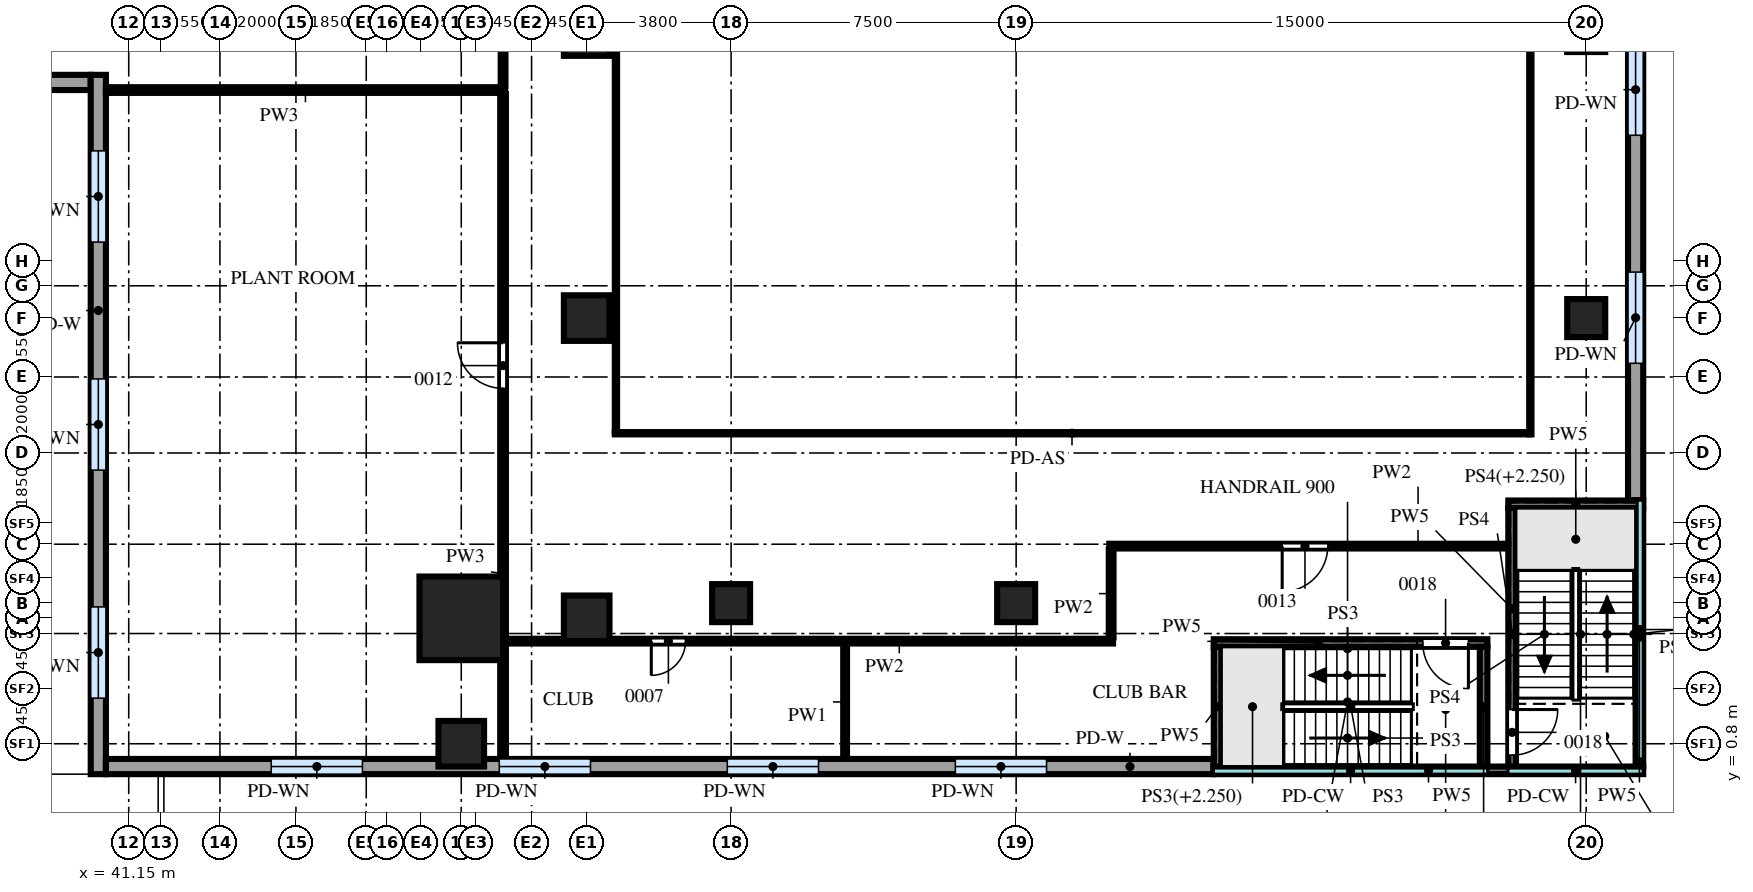
"""IFC4 building model, lengths in metres.
Left out: names, types, materials, properties, quantities, classifications, styles, units other than length and angle.
Written with IfcOpenShell. Run it as: python <this file> out.ifc"""

import sys

from ifc_helpers import new_model, si_unit, direction, frame, frame_2d, origin, origin_2d, place, context, subcontext, project, spatial, rectangle, extrude, source, transform, mapped, element, fill, save


model = new_model("IFC4")
c1 = context("Model", 3, precision=1e-05, world=origin(), true_north=direction((0.0, 1.0)))
c2 = subcontext(c1, "Body", "Model", "MODEL_VIEW")
j1 = project(units=[si_unit("LENGTHUNIT", "METRE"), si_unit("PLANEANGLEUNIT", "RADIAN")], contexts=[c1])
p1 = place(None, origin())
s1 = spatial("IfcSite", under=j1, at=p1, CompositionType="ELEMENT")
p2 = place(p1, origin())
s2 = spatial("IfcBuilding", under=s1, at=p2, CompositionType="ELEMENT")
p3 = place(p2, frame((0.0, 0.0, 28.5)))
s3 = spatial("IfcBuildingStorey", under=s2, at=p3, CompositionType="ELEMENT", Elevation=28.5)
m1 = source(origin(), c2, "Body", "SweptSolid", [
    extrude(rectangle(XDim=2.2, YDim=2.2, at=origin_2d()), origin(), (0.0, 0.0, 1.0), 4.5),
])
p4 = place(p3, frame((49.9, 4.1, 0.0), z_axis=(0.0, 0.0, 1.0), x_axis=(1.0, 0.0, 0.0)))
e1 = element("IfcColumn", 1, at=p4, inside=s3, PredefinedType="COLUMN", context=c2, shape_type="MappedRepresentation", body=[
    mapped(m1, transform((0.0, 0.0, 0.0))),
])
m2 = source(origin(), c2, "Body", "SweptSolid", [
    extrude(rectangle(XDim=1.2, YDim=1.2, at=origin_2d()), origin(), (0.0, 0.0, 1.0), 4.0),
])
for number, where, z_axis, x_axis in (
    (2, (49.9, 0.8, 0.0), (0.0, 0.0, 1.0), (1.0, 0.0, 0.0)),
    (3, (53.2, 4.1, 0.0), (0.0, 0.0, 1.0), (1.0, 0.0, 0.0)),
    (4, (53.2, 12.0, 0.0), (0.0, 0.0, 1.0), (1.0, 0.0, 0.0)),
    (5, (53.2, 19.5, 0.0), (0.0, 0.0, 1.0), (1.0, 0.0, 0.0)),
):
    element("IfcColumn", number, at=place(p3, frame(where, z_axis=z_axis, x_axis=x_axis)), inside=s3, PredefinedType="COLUMN", context=c2, shape_type="MappedRepresentation", body=[
        mapped(m2, transform((0.0, 0.0, 0.0))),
    ])
m3 = source(origin(), c2, "Body", "SweptSolid", [
    extrude(rectangle(XDim=1.0, YDim=1.0, at=origin_2d()), origin(), (0.0, 0.0, 1.0), 4.5),
])
for number, where, z_axis, x_axis in (
    (6, (57.0, 4.5, 0.0), (0.0, 0.0, 1.0), (1.0, 0.0, 0.0)),
    (7, (64.5, 4.5, 0.0), (0.0, 0.0, 1.0), (1.0, 0.0, 0.0)),
    (8, (79.5, 12.0, 0.0), (0.0, 0.0, 1.0), (1.0, 0.0, 0.0)),
):
    element("IfcColumn", number, at=place(p3, frame(where, z_axis=z_axis, x_axis=x_axis)), inside=s3, PredefinedType="COLUMN", context=c2, shape_type="MappedRepresentation", body=[
        mapped(m3, transform((0.0, 0.0, 0.0))),
    ])
m4 = source(origin(), c2, "Body", "SweptSolid", [
    extrude(rectangle(XDim=8.7, YDim=0.4, at=frame_2d((4.35, 0.0))), origin(), (0.0, 0.0, 1.0), 4.2),
])
p5 = place(p3, frame((31.45, 18.2, 0.0), z_axis=(0.0, 0.0, 1.0), x_axis=(1.0, 0.0, 0.0)))
e9 = element("IfcWall", 9, at=p5, inside=s3, PredefinedType="SOLIDWALL", context=c2, shape_type="MappedRepresentation", body=[
    mapped(m4, transform((0.0, 0.0, 0.0))),
])
m5 = source(origin(), c2, "Body", "SweptSolid", [
    extrude(rectangle(XDim=2.4, YDim=2.4, at=frame_2d((1.2, 1.2))), frame((0.0, 0.21, 0.0), z_axis=(0.0, -1.0, 0.0), x_axis=(1.0, 0.0, 0.0)), (0.0, 0.0, 1.0), 0.42),
])
p6 = place(p5, frame((3.15, 0.0, 1.0)))
e10 = element("IfcOpeningElement", 10, at=p6, cuts=e9, PredefinedType="OPENING", context=c2, shape_type="MappedRepresentation", body=[
    mapped(m5, transform((0.0, 0.0, 0.0))),
])
m6 = source(origin(), c2, "Body", "SweptSolid", [
    extrude(rectangle(XDim=18.4, YDim=0.4, at=frame_2d((9.2, 0.0))), origin(), (0.0, 0.0, 1.0), 4.2),
])
p7 = place(p3, frame((40.35, 18.4, 0.0), z_axis=(0.0, 0.0, 1.0), x_axis=(0.0, -1.0, 0.0)))
e11 = element("IfcWall", 11, at=p7, inside=s3, PredefinedType="SOLIDWALL", context=c2, shape_type="MappedRepresentation", body=[
    mapped(m6, transform((0.0, 0.0, 0.0))),
])
p8 = place(p7, frame((2.0, 0.0, 1.0)))
e12 = element("IfcOpeningElement", 12, at=p8, cuts=e11, PredefinedType="OPENING", context=c2, shape_type="MappedRepresentation", body=[
    mapped(m5, transform((0.0, 0.0, 0.0))),
])
p9 = place(p7, frame((8.0, 0.0, 1.0)))
e13 = element("IfcOpeningElement", 13, at=p9, cuts=e11, PredefinedType="OPENING", context=c2, shape_type="MappedRepresentation", body=[
    mapped(m5, transform((0.0, 0.0, 0.0))),
])
p10 = place(p7, frame((14.0, 0.0, 1.0)))
e14 = element("IfcOpeningElement", 14, at=p10, cuts=e11, PredefinedType="OPENING", context=c2, shape_type="MappedRepresentation", body=[
    mapped(m5, transform((0.0, 0.0, 0.0))),
])
m7 = source(origin(), c2, "Body", "SweptSolid", [
    extrude(rectangle(XDim=29.14, YDim=0.4, at=frame_2d((14.57, 0.0))), origin(), (0.0, 0.0, 1.0), 4.2),
])
p11 = place(p3, frame((40.55, 0.2, 0.0), z_axis=(0.0, 0.0, 1.0), x_axis=(1.0, 0.0, 0.0)))
e15 = element("IfcWall", 15, at=p11, inside=s3, PredefinedType="SOLIDWALL", context=c2, shape_type="MappedRepresentation", body=[
    mapped(m7, transform((0.0, 0.0, 0.0))),
])
p12 = place(p11, frame((4.35, 0.0, 1.0)))
e16 = element("IfcOpeningElement", 16, at=p12, cuts=e15, PredefinedType="OPENING", context=c2, shape_type="MappedRepresentation", body=[
    mapped(m5, transform((0.0, 0.0, 0.0))),
])
p13 = place(p11, frame((10.35, 0.0, 1.0)))
e17 = element("IfcOpeningElement", 17, at=p13, cuts=e15, PredefinedType="OPENING", context=c2, shape_type="MappedRepresentation", body=[
    mapped(m5, transform((0.0, 0.0, 0.0))),
])
p14 = place(p11, frame((16.35, 0.0, 1.0)))
e18 = element("IfcOpeningElement", 18, at=p14, cuts=e15, PredefinedType="OPENING", context=c2, shape_type="MappedRepresentation", body=[
    mapped(m5, transform((0.0, 0.0, 0.0))),
])
p15 = place(p11, frame((22.35, 0.0, 1.0)))
e19 = element("IfcOpeningElement", 19, at=p15, cuts=e15, PredefinedType="OPENING", context=c2, shape_type="MappedRepresentation", body=[
    mapped(m5, transform((0.0, 0.0, 0.0))),
])
m8 = source(origin(), c2, "Body", "SweptSolid", [
    extrude(rectangle(XDim=39.58, YDim=0.4, at=frame_2d((19.79, 0.0))), origin(), (0.0, 0.0, 1.0), 4.2),
])
p16 = place(p3, frame((80.8, 7.21, 0.0), z_axis=(0.0, 0.0, 1.0), x_axis=(0.0, 1.0, 0.0)))
e20 = element("IfcWall", 20, at=p16, inside=s3, PredefinedType="SOLIDWALL", context=c2, shape_type="MappedRepresentation", body=[
    mapped(m8, transform((0.0, 0.0, 0.0))),
])
p17 = place(p16, frame((3.6, 0.0, 1.0)))
e21 = element("IfcOpeningElement", 21, at=p17, cuts=e20, PredefinedType="OPENING", context=c2, shape_type="MappedRepresentation", body=[
    mapped(m5, transform((0.0, 0.0, 0.0))),
])
p18 = place(p16, frame((9.6, 0.0, 1.0)))
e22 = element("IfcOpeningElement", 22, at=p18, cuts=e20, PredefinedType="OPENING", context=c2, shape_type="MappedRepresentation", body=[
    mapped(m5, transform((0.0, 0.0, 0.0))),
])
p19 = place(p16, frame((15.6, 0.0, 1.0)))
e23 = element("IfcOpeningElement", 23, at=p19, cuts=e20, PredefinedType="OPENING", context=c2, shape_type="MappedRepresentation", body=[
    mapped(m5, transform((0.0, 0.0, 0.0))),
])
p20 = place(p16, frame((21.6, 0.0, 1.0)))
e24 = element("IfcOpeningElement", 24, at=p20, cuts=e20, PredefinedType="OPENING", context=c2, shape_type="MappedRepresentation", body=[
    mapped(m5, transform((0.0, 0.0, 0.0))),
])
p21 = place(p16, frame((27.6, 0.0, 1.0)))
e25 = element("IfcOpeningElement", 25, at=p21, cuts=e20, PredefinedType="OPENING", context=c2, shape_type="MappedRepresentation", body=[
    mapped(m5, transform((0.0, 0.0, 0.0))),
])
p22 = place(p16, frame((33.6, 0.0, 1.0)))
e26 = element("IfcOpeningElement", 26, at=p22, cuts=e20, PredefinedType="OPENING", context=c2, shape_type="MappedRepresentation", body=[
    mapped(m5, transform((0.0, 0.0, 0.0))),
])
m9 = source(origin(), c2, "Body", "SweptSolid", [
    extrude(rectangle(XDim=36.06, YDim=0.06, at=frame_2d((18.03, 0.0))), origin(), (0.0, 0.0, 1.0), 4.2),
])
for number, where, z_axis, x_axis in (
    (27, (78.03, 8.94, 0.0), (0.0, 0.0, 1.0), (0.0, 1.0, 0.0)),
    (28, (53.97, 45.06, 0.0), (0.0, 0.0, 1.0), (0.0, -1.0, 0.0)),
):
    element("IfcWall", number, at=place(p3, frame(where, z_axis=z_axis, x_axis=x_axis)), inside=s3, PredefinedType="SOLIDWALL", context=c2, shape_type="MappedRepresentation", body=[
        mapped(m9, transform((0.0, 0.0, 0.0))),
    ])
m10 = source(origin(), c2, "Body", "SweptSolid", [
    extrude(rectangle(XDim=24.06, YDim=0.06, at=frame_2d((12.03, 0.0))), origin(), (0.0, 0.0, 1.0), 4.2),
])
p23 = place(p3, frame((53.94, 8.97, 0.0), z_axis=(0.0, 0.0, 1.0), x_axis=(1.0, 0.0, 0.0)))
e29 = element("IfcWall", 29, at=p23, inside=s3, PredefinedType="SOLIDWALL", context=c2, shape_type="MappedRepresentation", body=[
    mapped(m10, transform((0.0, 0.0, 0.0))),
])
m11 = source(origin(), c2, "Body", "SweptSolid", [
    extrude(rectangle(XDim=11.3, YDim=0.2, at=frame_2d((5.65, 0.0))), origin(), (0.0, 0.0, 1.0), 4.0),
])
p24 = place(p3, frame((69.7, 0.1, 0.0), z_axis=(0.0, 0.0, 1.0), x_axis=(1.0, 0.0, 0.0)))
e30 = element("IfcWall", 30, at=p24, inside=s3, PredefinedType="PARTITIONING", context=c2, shape_type="MappedRepresentation", body=[
    mapped(m11, transform((0.0, 0.0, 0.0))),
])
m12 = source(origin(), c2, "Body", "SweptSolid", [
    extrude(rectangle(XDim=7.2, YDim=0.2, at=frame_2d((3.6, 0.0))), origin(), (0.0, 0.0, 1.0), 4.0),
])
p25 = place(p3, frame((69.7, 3.45, 0.0), z_axis=(0.0, 0.0, 1.0), x_axis=(1.0, 0.0, 0.0)))
e31 = element("IfcWall", 31, at=p25, inside=s3, PredefinedType="PARTITIONING", context=c2, shape_type="MappedRepresentation", body=[
    mapped(m12, transform((0.0, 0.0, 0.0))),
])
m13 = source(origin(), c2, "Body", "SweptSolid", [
    extrude(rectangle(XDim=1.2, YDim=2.1, at=frame_2d((0.6, 1.05))), frame((0.0, 0.11, 0.0), z_axis=(0.0, -1.0, 0.0), x_axis=(1.0, 0.0, 0.0)), (0.0, 0.0, 1.0), 0.22),
])
p26 = place(p25, frame((5.5, 0.0, 0.0)))
e32 = element("IfcOpeningElement", 32, at=p26, cuts=e31, PredefinedType="OPENING", context=c2, shape_type="MappedRepresentation", body=[
    mapped(m13, transform((0.0, 0.0, 0.0))),
])
m14 = source(origin(), c2, "Body", "SweptSolid", [
    extrude(rectangle(XDim=3.15, YDim=0.2, at=frame_2d((1.575, 0.0))), origin(), (0.0, 0.0, 1.0), 4.0),
])
for number, where, z_axis, x_axis in (
    (33, (69.8, 0.2, 0.0), (0.0, 0.0, 1.0), (0.0, 1.0, 0.0)),
    (34, (76.8, 0.2, 0.0), (0.0, 0.0, 1.0), (0.0, 1.0, 0.0)),
):
    element("IfcWall", number, at=place(p3, frame(where, z_axis=z_axis, x_axis=x_axis)), inside=s3, PredefinedType="PARTITIONING", context=c2, shape_type="MappedRepresentation", body=[
        mapped(m14, transform((0.0, 0.0, 0.0))),
    ])
m15 = source(origin(), c2, "Body", "SweptSolid", [
    extrude(rectangle(XDim=3.55, YDim=0.2, at=frame_2d((1.775, 0.0))), origin(), (0.0, 0.0, 1.0), 4.0),
])
p27 = place(p3, frame((77.45, 7.1, 0.0), z_axis=(0.0, 0.0, 1.0), x_axis=(1.0, 0.0, 0.0)))
e35 = element("IfcWall", 35, at=p27, inside=s3, PredefinedType="PARTITIONING", context=c2, shape_type="MappedRepresentation", body=[
    mapped(m15, transform((0.0, 0.0, 0.0))),
])
m16 = source(origin(), c2, "Body", "SweptSolid", [
    extrude(rectangle(XDim=6.8, YDim=0.2, at=frame_2d((3.4, 0.0))), origin(), (0.0, 0.0, 1.0), 4.0),
])
p28 = place(p3, frame((77.55, 0.2, 0.0), z_axis=(0.0, 0.0, 1.0), x_axis=(0.0, 1.0, 0.0)))
e36 = element("IfcWall", 36, at=p28, inside=s3, PredefinedType="PARTITIONING", context=c2, shape_type="MappedRepresentation", body=[
    mapped(m16, transform((0.0, 0.0, 0.0))),
])
p29 = place(p28, frame((0.3, 0.0, 0.0)))
e37 = element("IfcOpeningElement", 37, at=p29, cuts=e36, PredefinedType="OPENING", context=c2, shape_type="MappedRepresentation", body=[
    mapped(m13, transform((0.0, 0.0, 0.0))),
])
p30 = place(p3, frame((80.9, 0.2, 0.0), z_axis=(0.0, 0.0, 1.0), x_axis=(0.0, 1.0, 0.0)))
e38 = element("IfcWall", 38, at=p30, inside=s3, PredefinedType="PARTITIONING", context=c2, shape_type="MappedRepresentation", body=[
    mapped(m16, transform((0.0, 0.0, 0.0))),
])
m17 = source(origin(), c2, "Body", "SweptSolid", [
    extrude(rectangle(XDim=17.5, YDim=0.15, at=frame_2d((8.75, 0.0))), origin(), (0.0, 0.0, 1.0), 4.0),
])
p31 = place(p3, frame((51.0, 0.4, 0.0), z_axis=(0.0, 0.0, 1.0), x_axis=(0.0, 1.0, 0.0)))
e39 = element("IfcWall", 39, at=p31, inside=s3, PredefinedType="PARTITIONING", context=c2, shape_type="MappedRepresentation", body=[
    mapped(m17, transform((0.0, 0.0, 0.0))),
])
m18 = source(origin(), c2, "Body", "SweptSolid", [
    extrude(rectangle(XDim=1.2, YDim=2.1, at=frame_2d((0.6, 1.05))), frame((0.0, 0.085, 0.0), z_axis=(0.0, -1.0, 0.0), x_axis=(1.0, 0.0, 0.0)), (0.0, 0.0, 1.0), 0.17),
])
p32 = place(p31, frame((9.75, 0.0, 0.0)))
e40 = element("IfcOpeningElement", 40, at=p32, cuts=e39, PredefinedType="OPENING", context=c2, shape_type="MappedRepresentation", body=[
    mapped(m18, transform((0.0, 0.0, 0.0))),
])
m19 = source(origin(), c2, "Body", "SweptSolid", [
    extrude(rectangle(XDim=3.0, YDim=0.1, at=frame_2d((1.5, 0.0))), origin(), (0.0, 0.0, 1.0), 4.0),
])
p33 = place(p3, frame((60.0, 0.4, 0.0), z_axis=(0.0, 0.0, 1.0), x_axis=(0.0, 1.0, 0.0)))
e41 = element("IfcWall", 41, at=p33, inside=s3, PredefinedType="PARTITIONING", context=c2, shape_type="MappedRepresentation", body=[
    mapped(m19, transform((0.0, 0.0, 0.0))),
])
m20 = source(origin(), c2, "Body", "SweptSolid", [
    extrude(rectangle(XDim=15.95, YDim=0.125, at=frame_2d((7.975, 0.0))), origin(), (0.0, 0.0, 1.0), 4.0),
])
p34 = place(p3, frame((51.1, 3.5, 0.0), z_axis=(0.0, 0.0, 1.0), x_axis=(1.0, 0.0, 0.0)))
e42 = element("IfcWall", 42, at=p34, inside=s3, PredefinedType="PARTITIONING", context=c2, shape_type="MappedRepresentation", body=[
    mapped(m20, transform((0.0, 0.0, 0.0))),
])
m21 = source(origin(), c2, "Body", "SweptSolid", [
    extrude(rectangle(XDim=0.9, YDim=2.1, at=frame_2d((0.45, 1.05))), frame((0.0, 0.073, 0.0), z_axis=(0.0, -1.0, 0.0), x_axis=(1.0, 0.0, 0.0)), (0.0, 0.0, 1.0), 0.145),
])
p35 = place(p34, frame((3.8, 0.0, 0.0)))
e43 = element("IfcOpeningElement", 43, at=p35, cuts=e42, PredefinedType="OPENING", context=c2, shape_type="MappedRepresentation", body=[
    mapped(m21, transform((0.0, 0.0, 0.0))),
])
m22 = source(origin(), c2, "Body", "SweptSolid", [
    extrude(rectangle(XDim=2.3, YDim=0.125, at=frame_2d((1.15, 0.0))), origin(), (0.0, 0.0, 1.0), 4.0),
])
p36 = place(p3, frame((67.0, 3.6, 0.0), z_axis=(0.0, 0.0, 1.0), x_axis=(0.0, 1.0, 0.0)))
e44 = element("IfcWall", 44, at=p36, inside=s3, PredefinedType="PARTITIONING", context=c2, shape_type="MappedRepresentation", body=[
    mapped(m22, transform((0.0, 0.0, 0.0))),
])
m23 = source(origin(), c2, "Body", "SweptSolid", [
    extrude(rectangle(XDim=10.5, YDim=0.125, at=frame_2d((5.25, 0.0))), origin(), (0.0, 0.0, 1.0), 4.0),
])
p37 = place(p3, frame((66.95, 6.0, 0.0), z_axis=(0.0, 0.0, 1.0), x_axis=(1.0, 0.0, 0.0)))
e45 = element("IfcWall", 45, at=p37, inside=s3, PredefinedType="PARTITIONING", context=c2, shape_type="MappedRepresentation", body=[
    mapped(m23, transform((0.0, 0.0, 0.0))),
])
m24 = source(origin(), c2, "Body", "SweptSolid", [
    extrude(rectangle(XDim=1.2, YDim=2.1, at=frame_2d((0.6, 1.05))), frame((0.0, 0.073, 0.0), z_axis=(0.0, -1.0, 0.0), x_axis=(1.0, 0.0, 0.0)), (0.0, 0.0, 1.0), 0.145),
])
p38 = place(p37, frame((4.55, 0.0, 0.0)))
e46 = element("IfcOpeningElement", 46, at=p38, cuts=e45, PredefinedType="OPENING", context=c2, shape_type="MappedRepresentation", body=[
    mapped(m24, transform((0.0, 0.0, 0.0))),
])
m25 = source(origin(), c2, "Body", "SweptSolid", [
    extrude(rectangle(XDim=10.5, YDim=0.15, at=frame_2d((5.25, 0.0))), origin(), (0.0, 0.0, 1.0), 4.0),
])
p39 = place(p3, frame((40.55, 18.0, 0.0), z_axis=(0.0, 0.0, 1.0), x_axis=(1.0, 0.0, 0.0)))
e47 = element("IfcWall", 47, at=p39, inside=s3, PredefinedType="PARTITIONING", context=c2, shape_type="MappedRepresentation", body=[
    mapped(m25, transform((0.0, 0.0, 0.0))),
])
m26 = source(origin(), c2, "Body", "SweptSolid", [
    extrude(rectangle(XDim=15.2, YDim=0.125, at=frame_2d((7.6, 0.0))), origin(), (0.0, 0.0, 1.0), 4.0),
])
p40 = place(p3, frame((51.0, 18.1, 0.0), z_axis=(0.0, 0.0, 1.0), x_axis=(0.0, 1.0, 0.0)))
e48 = element("IfcWall", 48, at=p40, inside=s3, PredefinedType="PARTITIONING", context=c2, shape_type="MappedRepresentation", body=[
    mapped(m26, transform((0.0, 0.0, 0.0))),
])
m27 = source(origin(), c2, "Body", "SweptSolid", [
    extrude(rectangle(XDim=2.4, YDim=2.4, at=frame_2d((1.2, 1.2))), frame((0.0, 0.03, 0.0), z_axis=(0.0, -1.0, 0.0), x_axis=(1.0, 0.0, 0.0)), (0.0, 0.0, 1.0), 0.06),
])
p41 = place(p8, origin())
e49 = element("IfcWindow", 49, at=p41, inside=s3, PartitioningType="SINGLE_PANEL", PredefinedType="WINDOW", context=c2, shape_type="MappedRepresentation", body=[
    mapped(m27, transform((0.0, 0.0, 0.0))),
])
fill(e12, e49)
p42 = place(p9, origin())
e50 = element("IfcWindow", 50, at=p42, inside=s3, PartitioningType="SINGLE_PANEL", PredefinedType="WINDOW", context=c2, shape_type="MappedRepresentation", body=[
    mapped(m27, transform((0.0, 0.0, 0.0))),
])
fill(e13, e50)
p43 = place(p10, origin())
e51 = element("IfcWindow", 51, at=p43, inside=s3, PartitioningType="SINGLE_PANEL", PredefinedType="WINDOW", context=c2, shape_type="MappedRepresentation", body=[
    mapped(m27, transform((0.0, 0.0, 0.0))),
])
fill(e14, e51)
p44 = place(p12, origin())
e52 = element("IfcWindow", 52, at=p44, inside=s3, PartitioningType="SINGLE_PANEL", PredefinedType="WINDOW", context=c2, shape_type="MappedRepresentation", body=[
    mapped(m27, transform((0.0, 0.0, 0.0))),
])
fill(e16, e52)
p45 = place(p13, origin())
e53 = element("IfcWindow", 53, at=p45, inside=s3, PartitioningType="SINGLE_PANEL", PredefinedType="WINDOW", context=c2, shape_type="MappedRepresentation", body=[
    mapped(m27, transform((0.0, 0.0, 0.0))),
])
fill(e17, e53)
p46 = place(p14, origin())
e54 = element("IfcWindow", 54, at=p46, inside=s3, PartitioningType="SINGLE_PANEL", PredefinedType="WINDOW", context=c2, shape_type="MappedRepresentation", body=[
    mapped(m27, transform((0.0, 0.0, 0.0))),
])
fill(e18, e54)
p47 = place(p15, origin())
e55 = element("IfcWindow", 55, at=p47, inside=s3, PartitioningType="SINGLE_PANEL", PredefinedType="WINDOW", context=c2, shape_type="MappedRepresentation", body=[
    mapped(m27, transform((0.0, 0.0, 0.0))),
])
fill(e19, e55)
p48 = place(p17, origin())
e56 = element("IfcWindow", 56, at=p48, inside=s3, PartitioningType="SINGLE_PANEL", PredefinedType="WINDOW", context=c2, shape_type="MappedRepresentation", body=[
    mapped(m27, transform((0.0, 0.0, 0.0))),
])
fill(e21, e56)
p49 = place(p18, origin())
e57 = element("IfcWindow", 57, at=p49, inside=s3, PartitioningType="SINGLE_PANEL", PredefinedType="WINDOW", context=c2, shape_type="MappedRepresentation", body=[
    mapped(m27, transform((0.0, 0.0, 0.0))),
])
fill(e22, e57)
m28 = source(origin(), c2, "Body", "SweptSolid", [
    extrude(rectangle(XDim=1.2, YDim=2.1, at=frame_2d((0.6, 1.05))), frame((0.0, 0.025, 0.0), z_axis=(0.0, -1.0, 0.0), x_axis=(1.0, 0.0, 0.0)), (0.0, 0.0, 1.0), 0.05),
])
p50 = place(p32, origin())
e58 = element("IfcDoor", 58, at=p50, inside=s3, OperationType="SINGLE_SWING_LEFT", PredefinedType="DOOR", context=c2, shape_type="MappedRepresentation", body=[
    mapped(m28, transform((0.0, 0.0, 0.0))),
])
fill(e40, e58)
m29 = source(origin(), c2, "Body", "SweptSolid", [
    extrude(rectangle(XDim=0.9, YDim=2.1, at=frame_2d((0.45, 1.05))), frame((0.0, 0.025, 0.0), z_axis=(0.0, -1.0, 0.0), x_axis=(1.0, 0.0, 0.0)), (0.0, 0.0, 1.0), 0.05),
])
p51 = place(p35, origin())
e59 = element("IfcDoor", 59, at=p51, inside=s3, OperationType="SINGLE_SWING_LEFT", PredefinedType="DOOR", context=c2, shape_type="MappedRepresentation", body=[
    mapped(m29, transform((0.0, 0.0, 0.0))),
])
fill(e43, e59)
p52 = place(p38, origin())
e60 = element("IfcDoor", 60, at=p52, inside=s3, OperationType="SINGLE_SWING_LEFT", PredefinedType="DOOR", context=c2, shape_type="MappedRepresentation", body=[
    mapped(m28, transform((0.0, 0.0, 0.0))),
])
fill(e46, e60)
p53 = place(p26, origin())
e61 = element("IfcDoor", 61, at=p53, inside=s3, OperationType="SINGLE_SWING_RIGHT", PredefinedType="DOOR", context=c2, shape_type="MappedRepresentation", body=[
    mapped(m28, transform((0.0, 0.0, 0.0))),
])
fill(e32, e61)
p54 = place(p29, origin())
e62 = element("IfcDoor", 62, at=p54, inside=s3, OperationType="SINGLE_SWING_RIGHT", PredefinedType="DOOR", context=c2, shape_type="MappedRepresentation", body=[
    mapped(m28, transform((0.0, 0.0, 0.0))),
])
fill(e37, e62)
save(model, sys.argv[1])
